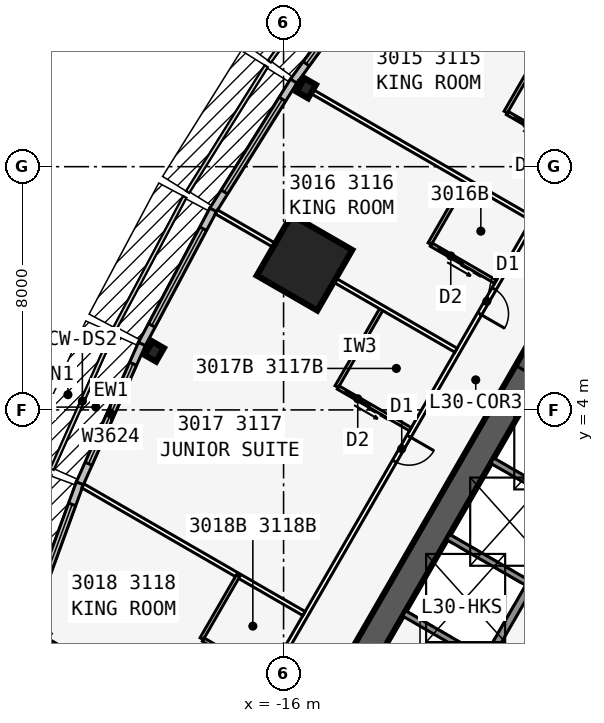
"""IFC4 building model, lengths in metres.
Left out: names, types, materials, properties, quantities, classifications, styles, units other than length and angle.
Written with IfcOpenShell. Run it as: python <this file> out.ifc"""

import sys

from ifc_helpers import new_model, si_unit, direction, frame, frame_2d, origin, origin_2d, place, context, subcontext, project, spatial, rectangle, i_section, extrude, element, fill, save


model = new_model("IFC4")
c1 = context("Model", 3, precision=1e-05, world=origin(), true_north=direction((0.0, 1.0)))
c2 = subcontext(c1, "Body", "Model", "MODEL_VIEW")
j1 = project(units=[si_unit("LENGTHUNIT", "METRE"), si_unit("PLANEANGLEUNIT", "RADIAN")], contexts=[c1])
p1 = place(None, origin())
s1 = spatial("IfcSite", under=j1, at=p1, CompositionType="ELEMENT")
p2 = place(p1, origin())
s2 = spatial("IfcBuilding", under=s1, at=p2, CompositionType="ELEMENT")
p3 = place(p2, frame((0.0, 0.0, 118.1)))
s3 = spatial("IfcBuildingStorey", under=s2, at=p3, CompositionType="ELEMENT", Elevation=118.1)
p4 = place(p3, frame((0.0, 19.052, 0.0), z_axis=(0.0, 0.0, 1.0), x_axis=(-0.499999749417, -0.866025548458, 0.0)))
e1 = element("IfcWall", 1, at=p4, inside=s3, PredefinedType="SHEAR", context=c2, shape_type="SweptSolid", body=[
    extrude(rectangle(XDim=33.0, YDim=0.9, at=frame_2d((16.5, 0.0))), origin(), (0.0, 0.0, 1.0), 3.4),
])
p5 = place(p4, frame((14.15, 0.0, 0.0)))
e2 = element("IfcOpeningElement", 2, at=p5, cuts=e1, PredefinedType="OPENING", context=c2, shape_type="SweptSolid", body=[
    extrude(rectangle(XDim=1.8, YDim=2.13, at=frame_2d((0.9, 1.065))), frame((0.0, 0.46, 0.0), z_axis=(0.0, -1.0, 0.0), x_axis=(1.0, 0.0, 0.0)), (0.0, 0.0, 1.0), 0.92),
])
p6 = place(p4, frame((12.6, 0.0, 0.0)))
e3 = element("IfcOpeningElement", 3, at=p6, cuts=e1, PredefinedType="OPENING", context=c2, shape_type="SweptSolid", body=[
    extrude(rectangle(XDim=1.0, YDim=2.13, at=frame_2d((0.5, 1.065))), frame((0.0, 0.46, 0.0), z_axis=(0.0, -1.0, 0.0), x_axis=(1.0, 0.0, 0.0)), (0.0, 0.0, 1.0), 0.92),
])
p7 = place(p3, frame((-4.929, 3.365, 0.0), z_axis=(0.0, 0.0, 1.0), x_axis=(-0.499991433582, -0.866030349552, 0.0)))
e4 = element("IfcWall", 4, at=p7, inside=s3, PredefinedType="SOLIDWALL", context=c2, shape_type="SweptSolid", body=[
    extrude(rectangle(XDim=10.633, YDim=0.25, at=frame_2d((5.316, 0.0))), origin(), (0.0, 0.0, 1.0), 3.235),
])
p8 = place(p7, frame((9.164, 0.0, 0.0)))
e5 = element("IfcOpeningElement", 5, at=p8, cuts=e4, PredefinedType="OPENING", context=c2, shape_type="SweptSolid", body=[
    extrude(rectangle(XDim=0.9, YDim=2.13, at=frame_2d((0.45, 1.065))), frame((0.0, 0.135, 0.0), z_axis=(0.0, -1.0, 0.0), x_axis=(1.0, 0.0, 0.0)), (0.0, 0.0, 1.0), 0.27),
])
for number, where, z_axis, x_axis in (
    (6, (-6.429, 0.767, 0.0), (0.0, 0.0, 1.0), (-0.866, 0.5, 0.0)),
    (7, (-7.879, -1.744, 0.0), (0.0, 0.0, 1.0), (-0.866, 0.5, 0.0)),
    (8, (-9.329, -4.256, 0.0), (0.0, 0.0, 1.0), (-0.866, 0.5, 0.0)),
):
    element("IfcWall", number, at=place(p3, frame(where, z_axis=z_axis, x_axis=x_axis)), inside=s3, PredefinedType="SOLIDWALL", context=c2, shape_type="SweptSolid", body=[
        extrude(rectangle(XDim=3.125, YDim=0.2, at=frame_2d((1.562, 0.0))), origin(), (0.0, 0.0, 1.0), 3.235),
    ])
for number, where, z_axis, x_axis in (
    (9, (-15.254, 14.58, 0.0), (0.0, 0.0, 1.0), (-0.866, 0.5, 0.0)),
    (10, (-20.254, 5.92, 0.0), (0.0, 0.0, 1.0), (-0.866, 0.5, 0.0)),
):
    element("IfcColumn", number, at=place(p3, frame(where, z_axis=z_axis, x_axis=x_axis)), inside=s3, PredefinedType="COLUMN", context=c2, shape_type="SweptSolid", body=[
        extrude(i_section(OverallWidth=0.437, OverallDepth=0.513, WebThickness=0.061, FlangeThickness=0.097, at=origin_2d()), origin(), (0.0, 0.0, 1.0), 3.4),
    ])
p9 = place(p3, frame((-15.312, 8.84, 0.0), z_axis=(0.0, 0.0, 1.0), x_axis=(-0.866025403784, 0.5, 0.0)))
e11 = element("IfcColumn", 11, at=p9, inside=s3, PredefinedType="COLUMN", context=c2, shape_type="SweptSolid", body=[
    extrude(rectangle(XDim=2.3, YDim=2.3, at=origin_2d()), origin(), (0.0, 0.0, 1.0), 3.4),
])
p10 = place(p3, frame((-12.718, 18.875, 0.0), z_axis=(0.0, 0.0, 1.0), x_axis=(-0.587669188412, -0.809101307001, 0.0)))
e12 = element("IfcWall", 12, at=p10, inside=s3, PredefinedType="STANDARD", context=c2, shape_type="SweptSolid", body=[
    extrude(rectangle(XDim=5.028, YDim=0.25, at=frame_2d((2.514, 0.0))), origin(), (0.0, 0.0, 1.0), 3.235),
])
p11 = place(p10, frame((0.714, 0.0, 0.45)))
e13 = element("IfcOpeningElement", 13, at=p11, cuts=e12, PredefinedType="OPENING", context=c2, shape_type="SweptSolid", body=[
    extrude(rectangle(XDim=3.6, YDim=2.4, at=frame_2d((1.8, 1.2))), frame((0.0, 0.135, 0.0), z_axis=(0.0, -1.0, 0.0), x_axis=(1.0, 0.0, 0.0)), (0.0, 0.0, 1.0), 0.27),
])
p12 = place(p3, frame((-15.667, 14.814, 0.0), z_axis=(0.0, 0.0, 1.0), x_axis=(-0.529990167382, -0.84800378683, 0.0)))
e14 = element("IfcWall", 14, at=p12, inside=s3, PredefinedType="STANDARD", context=c2, shape_type="SweptSolid", body=[
    extrude(rectangle(XDim=5.003, YDim=0.25, at=frame_2d((2.501, 0.0))), origin(), (0.0, 0.0, 1.0), 3.235),
])
p13 = place(p12, frame((0.701, 0.0, 0.45)))
e15 = element("IfcOpeningElement", 15, at=p13, cuts=e14, PredefinedType="OPENING", context=c2, shape_type="SweptSolid", body=[
    extrude(rectangle(XDim=3.6, YDim=2.4, at=frame_2d((1.8, 1.2))), frame((0.0, 0.135, 0.0), z_axis=(0.0, -1.0, 0.0), x_axis=(1.0, 0.0, 0.0)), (0.0, 0.0, 1.0), 0.27),
])
p14 = place(p3, frame((-18.314, 10.579, 0.0), z_axis=(0.0, 0.0, 1.0), x_axis=(-0.469404966864, -0.882982999317, 0.0)))
e16 = element("IfcWall", 16, at=p14, inside=s3, PredefinedType="STANDARD", context=c2, shape_type="SweptSolid", body=[
    extrude(rectangle(XDim=5.003, YDim=0.25, at=frame_2d((2.501, 0.0))), origin(), (0.0, 0.0, 1.0), 3.235),
])
p15 = place(p14, frame((0.701, 0.0, 0.45)))
e17 = element("IfcOpeningElement", 17, at=p15, cuts=e16, PredefinedType="OPENING", context=c2, shape_type="SweptSolid", body=[
    extrude(rectangle(XDim=3.6, YDim=2.4, at=frame_2d((1.8, 1.2))), frame((0.0, 0.135, 0.0), z_axis=(0.0, -1.0, 0.0), x_axis=(1.0, 0.0, 0.0)), (0.0, 0.0, 1.0), 0.27),
])
p16 = place(p3, frame((-20.659, 6.169, 0.0), z_axis=(0.0, 0.0, 1.0), x_axis=(-0.406832200364, -0.913502906808, 0.0)))
e18 = element("IfcWall", 18, at=p16, inside=s3, PredefinedType="STANDARD", context=c2, shape_type="SweptSolid", body=[
    extrude(rectangle(XDim=5.028, YDim=0.25, at=frame_2d((2.514, 0.0))), origin(), (0.0, 0.0, 1.0), 3.235),
])
p17 = place(p16, frame((0.714, 0.0, 0.45)))
e19 = element("IfcOpeningElement", 19, at=p17, cuts=e18, PredefinedType="OPENING", context=c2, shape_type="SweptSolid", body=[
    extrude(rectangle(XDim=3.6, YDim=2.4, at=frame_2d((1.8, 1.2))), frame((0.0, 0.135, 0.0), z_axis=(0.0, -1.0, 0.0), x_axis=(1.0, 0.0, 0.0)), (0.0, 0.0, 1.0), 0.27),
])
p18 = place(p3, frame((-22.701, 1.584, 0.0), z_axis=(0.0, 0.0, 1.0), x_axis=(-0.343225593282, -0.939252996863, 0.0)))
e20 = element("IfcWall", 20, at=p18, inside=s3, PredefinedType="STANDARD", context=c2, shape_type="SweptSolid", body=[
    extrude(rectangle(XDim=5.076, YDim=0.25, at=frame_2d((2.538, 0.0))), origin(), (0.0, 0.0, 1.0), 3.235),
])
p19 = place(p18, frame((0.738, 0.0, 0.45)))
e21 = element("IfcOpeningElement", 21, at=p19, cuts=e20, PredefinedType="OPENING", context=c2, shape_type="SweptSolid", body=[
    extrude(rectangle(XDim=3.6, YDim=2.4, at=frame_2d((1.8, 1.2))), frame((0.0, 0.135, 0.0), z_axis=(0.0, -1.0, 0.0), x_axis=(1.0, 0.0, 0.0)), (0.0, 0.0, 1.0), 0.27),
])
p20 = place(p3, frame((-0.5, 22.836, 0.0), z_axis=(0.0, 0.0, 1.0), x_axis=(-0.500001677587, -0.866024435227, 0.0)))
e22 = element("IfcWall", 22, at=p20, inside=s3, PredefinedType="PARTITIONING", context=c2, shape_type="SweptSolid", body=[
    extrude(rectangle(XDim=39.054, YDim=0.15, at=frame_2d((19.527, 0.0))), origin(), (0.0, 0.0, 1.0), 3.235),
])
p21 = place(p20, frame((0.352, 0.0, 0.0)))
e23 = element("IfcOpeningElement", 23, at=p21, cuts=e22, PredefinedType="OPENING", context=c2, shape_type="SweptSolid", body=[
    extrude(rectangle(XDim=0.95, YDim=2.13, at=frame_2d((0.475, 1.065))), frame((0.0, 0.085, 0.0), z_axis=(0.0, -1.0, 0.0), x_axis=(1.0, 0.0, 0.0)), (0.0, 0.0, 1.0), 0.17),
])
p22 = place(p20, frame((7.152, 0.0, 0.0)))
e24 = element("IfcOpeningElement", 24, at=p22, cuts=e22, PredefinedType="OPENING", context=c2, shape_type="SweptSolid", body=[
    extrude(rectangle(XDim=0.95, YDim=2.13, at=frame_2d((0.475, 1.065))), frame((0.0, 0.085, 0.0), z_axis=(0.0, -1.0, 0.0), x_axis=(1.0, 0.0, 0.0)), (0.0, 0.0, 1.0), 0.17),
])
p23 = place(p20, frame((12.152, 0.0, 0.0)))
e25 = element("IfcOpeningElement", 25, at=p23, cuts=e22, PredefinedType="OPENING", context=c2, shape_type="SweptSolid", body=[
    extrude(rectangle(XDim=0.95, YDim=2.13, at=frame_2d((0.475, 1.065))), frame((0.0, 0.085, 0.0), z_axis=(0.0, -1.0, 0.0), x_axis=(1.0, 0.0, 0.0)), (0.0, 0.0, 1.0), 0.17),
])
p24 = place(p20, frame((17.152, 0.0, 0.0)))
e26 = element("IfcOpeningElement", 26, at=p24, cuts=e22, PredefinedType="OPENING", context=c2, shape_type="SweptSolid", body=[
    extrude(rectangle(XDim=0.95, YDim=2.13, at=frame_2d((0.475, 1.065))), frame((0.0, 0.085, 0.0), z_axis=(0.0, -1.0, 0.0), x_axis=(1.0, 0.0, 0.0)), (0.0, 0.0, 1.0), 0.17),
])
p25 = place(p20, frame((22.752, 0.0, 0.0)))
e27 = element("IfcOpeningElement", 27, at=p25, cuts=e22, PredefinedType="OPENING", context=c2, shape_type="SweptSolid", body=[
    extrude(rectangle(XDim=0.95, YDim=2.13, at=frame_2d((0.475, 1.065))), frame((0.0, 0.085, 0.0), z_axis=(0.0, -1.0, 0.0), x_axis=(1.0, 0.0, 0.0)), (0.0, 0.0, 1.0), 0.17),
])
p26 = place(p20, frame((32.152, 0.0, 0.0)))
e28 = element("IfcOpeningElement", 28, at=p26, cuts=e22, PredefinedType="OPENING", context=c2, shape_type="SweptSolid", body=[
    extrude(rectangle(XDim=0.95, YDim=2.13, at=frame_2d((0.475, 1.065))), frame((0.0, 0.085, 0.0), z_axis=(0.0, -1.0, 0.0), x_axis=(1.0, 0.0, 0.0)), (0.0, 0.0, 1.0), 0.17),
])
p27 = place(p20, frame((37.752, 0.0, 0.0)))
e29 = element("IfcOpeningElement", 29, at=p27, cuts=e22, PredefinedType="OPENING", context=c2, shape_type="SweptSolid", body=[
    extrude(rectangle(XDim=0.95, YDim=2.13, at=frame_2d((0.475, 1.065))), frame((0.0, 0.085, 0.0), z_axis=(0.0, -1.0, 0.0), x_axis=(1.0, 0.0, 0.0)), (0.0, 0.0, 1.0), 0.17),
])
p28 = place(p3, frame((-5.329, 14.623, 0.0), z_axis=(0.0, 0.0, 1.0), x_axis=(-0.866011723728, 0.500023693804, 0.0)))
e30 = element("IfcWall", 30, at=p28, inside=s3, PredefinedType="PARTITIONING", context=c2, shape_type="SweptSolid", body=[
    extrude(rectangle(XDim=8.395, YDim=0.15, at=frame_2d((4.198, 0.0))), origin(), (0.0, 0.0, 1.0), 2.389),
])
p29 = place(p3, frame((-7.829, 10.293, 0.0), z_axis=(0.0, 0.0, 1.0), x_axis=(-0.866027015393, 0.499997208602, 0.0)))
e31 = element("IfcWall", 31, at=p29, inside=s3, PredefinedType="PARTITIONING", context=c2, shape_type="SweptSolid", body=[
    extrude(rectangle(XDim=8.922, YDim=0.15, at=frame_2d((4.461, 0.0))), origin(), (0.0, 0.0, 1.0), 2.389),
])
p30 = place(p3, frame((-10.329, 5.963, 0.0), z_axis=(0.0, 0.0, 1.0), x_axis=(-0.866025170687, 0.500000403736, 0.0)))
e32 = element("IfcWall", 32, at=p30, inside=s3, PredefinedType="PARTITIONING", context=c2, shape_type="SweptSolid", body=[
    extrude(rectangle(XDim=9.099, YDim=0.15, at=frame_2d((4.549, 0.0))), origin(), (0.0, 0.0, 1.0), 2.389),
])
p31 = place(p3, frame((-15.329, -2.697, 0.0), z_axis=(0.0, 0.0, 1.0), x_axis=(-0.866024316602, 0.50000188305, 0.0)))
e33 = element("IfcWall", 33, at=p31, inside=s3, PredefinedType="PARTITIONING", context=c2, shape_type="SweptSolid", body=[
    extrude(rectangle(XDim=8.395, YDim=0.15, at=frame_2d((4.198, 0.0))), origin(), (0.0, 0.0, 1.0), 2.389),
])
p32 = place(p3, frame((-17.829, -7.027, 0.0), z_axis=(0.0, 0.0, 1.0), x_axis=(-0.866029804378, 0.499992377871, 0.0)))
e34 = element("IfcWall", 34, at=p32, inside=s3, PredefinedType="PARTITIONING", context=c2, shape_type="SweptSolid", body=[
    extrude(rectangle(XDim=7.516, YDim=0.15, at=frame_2d((3.758, 0.0))), origin(), (0.0, 0.0, 1.0), 2.389),
])
p33 = place(p3, frame((-7.493, 15.873, 0.0), z_axis=(0.0, 0.0, 1.0), x_axis=(-0.500077600433, -0.865980596518, 0.0)))
e35 = element("IfcWall", 35, at=p33, inside=s3, PredefinedType="PLUMBINGWALL", context=c2, shape_type="SweptSolid", body=[
    extrude(rectangle(XDim=2.4, YDim=0.12, at=frame_2d((1.2, 0.0))), origin(), (0.0, 0.0, 1.0), 3.235),
])
p34 = place(p3, frame((-6.529, 12.545, 0.0), z_axis=(0.0, 0.0, 1.0), x_axis=(-0.866023955769, 0.500002508028, 0.0)))
e36 = element("IfcWall", 36, at=p34, inside=s3, PredefinedType="PLUMBINGWALL", context=c2, shape_type="SweptSolid", body=[
    extrude(rectangle(XDim=2.44, YDim=0.12, at=frame_2d((1.22, 0.0))), origin(), (0.0, 0.0, 1.0), 3.235),
])
p35 = place(p34, frame((1.25, 0.0, 0.0)))
e37 = element("IfcOpeningElement", 37, at=p35, cuts=e36, PredefinedType="OPENING", context=c2, shape_type="SweptSolid", body=[
    extrude(rectangle(XDim=0.9, YDim=2.13, at=frame_2d((0.45, 1.065))), frame((0.0, 0.07, 0.0), z_axis=(0.0, -1.0, 0.0), x_axis=(1.0, 0.0, 0.0)), (0.0, 0.0, 1.0), 0.14),
])
p36 = place(p3, frame((-9.993, 11.543, 0.0), z_axis=(0.0, 0.0, 1.0), x_axis=(-0.500077600433, -0.865980596518, 0.0)))
e38 = element("IfcWall", 38, at=p36, inside=s3, PredefinedType="PLUMBINGWALL", context=c2, shape_type="SweptSolid", body=[
    extrude(rectangle(XDim=2.4, YDim=0.12, at=frame_2d((1.2, 0.0))), origin(), (0.0, 0.0, 1.0), 3.235),
])
p37 = place(p3, frame((-9.029, 8.215, 0.0), z_axis=(0.0, 0.0, 1.0), x_axis=(-0.866023955769, 0.500002508028, 0.0)))
e39 = element("IfcWall", 39, at=p37, inside=s3, PredefinedType="PLUMBINGWALL", context=c2, shape_type="SweptSolid", body=[
    extrude(rectangle(XDim=2.44, YDim=0.12, at=frame_2d((1.22, 0.0))), origin(), (0.0, 0.0, 1.0), 3.235),
])
p38 = place(p37, frame((1.25, 0.0, 0.0)))
e40 = element("IfcOpeningElement", 40, at=p38, cuts=e39, PredefinedType="OPENING", context=c2, shape_type="SweptSolid", body=[
    extrude(rectangle(XDim=0.9, YDim=2.13, at=frame_2d((0.45, 1.065))), frame((0.0, 0.07, 0.0), z_axis=(0.0, -1.0, 0.0), x_axis=(1.0, 0.0, 0.0)), (0.0, 0.0, 1.0), 0.14),
])
p39 = place(p3, frame((-12.753, 7.363, 0.0), z_axis=(0.0, 0.0, 1.0), x_axis=(-0.50002537861, -0.866010750942, 0.0)))
e41 = element("IfcWall", 41, at=p39, inside=s3, PredefinedType="PLUMBINGWALL", context=c2, shape_type="SweptSolid", body=[
    extrude(rectangle(XDim=3.0, YDim=0.12, at=frame_2d((1.5, 0.0))), origin(), (0.0, 0.0, 1.0), 3.235),
])
p40 = place(p3, frame((-11.829, 3.365, 0.0), z_axis=(0.0, 0.0, 1.0), x_axis=(-0.865997131366, 0.500048966069, 0.0)))
e42 = element("IfcWall", 42, at=p40, inside=s3, PredefinedType="PLUMBINGWALL", context=c2, shape_type="SweptSolid", body=[
    extrude(rectangle(XDim=2.74, YDim=0.12, at=frame_2d((1.37, 0.0))), origin(), (0.0, 0.0, 1.0), 3.235),
])
p41 = place(p40, frame((1.55, 0.0, 0.0)))
e43 = element("IfcOpeningElement", 43, at=p41, cuts=e42, PredefinedType="OPENING", context=c2, shape_type="SweptSolid", body=[
    extrude(rectangle(XDim=0.9, YDim=2.13, at=frame_2d((0.45, 1.065))), frame((0.0, 0.07, 0.0), z_axis=(0.0, -1.0, 0.0), x_axis=(1.0, 0.0, 0.0)), (0.0, 0.0, 1.0), 0.14),
])
p42 = place(p3, frame((-17.493, -1.447, 0.0), z_axis=(0.0, 0.0, 1.0), x_axis=(-0.500033551112, -0.866006032174, 0.0)))
e44 = element("IfcWall", 44, at=p42, inside=s3, PredefinedType="PLUMBINGWALL", context=c2, shape_type="SweptSolid", body=[
    extrude(rectangle(XDim=2.4, YDim=0.12, at=frame_2d((1.2, 0.0))), origin(), (0.0, 0.0, 1.0), 3.235),
])
p43 = place(p3, frame((-16.529, -4.776, 0.0), z_axis=(0.0, 0.0, 1.0), x_axis=(-0.866023955769, 0.500002508028, 0.0)))
e45 = element("IfcWall", 45, at=p43, inside=s3, PredefinedType="PLUMBINGWALL", context=c2, shape_type="SweptSolid", body=[
    extrude(rectangle(XDim=2.44, YDim=0.12, at=frame_2d((1.22, 0.0))), origin(), (0.0, 0.0, 1.0), 3.235),
])
p44 = place(p43, frame((1.25, 0.0, 0.0)))
e46 = element("IfcOpeningElement", 46, at=p44, cuts=e45, PredefinedType="OPENING", context=c2, shape_type="SweptSolid", body=[
    extrude(rectangle(XDim=0.9, YDim=2.13, at=frame_2d((0.45, 1.065))), frame((0.0, 0.07, 0.0), z_axis=(0.0, -1.0, 0.0), x_axis=(1.0, 0.0, 0.0)), (0.0, 0.0, 1.0), 0.14),
])
p45 = place(p11, origin())
e47 = element("IfcWindow", 47, at=p45, inside=s3, PartitioningType="SINGLE_PANEL", PredefinedType="WINDOW", context=c2, shape_type="SweptSolid", body=[
    extrude(rectangle(XDim=3.6, YDim=2.4, at=frame_2d((1.8, 1.2))), frame((0.0, 0.03, 0.0), z_axis=(0.0, -1.0, 0.0), x_axis=(1.0, 0.0, 0.0)), (0.0, 0.0, 1.0), 0.06),
])
fill(e13, e47)
p46 = place(p13, origin())
e48 = element("IfcWindow", 48, at=p46, inside=s3, PartitioningType="SINGLE_PANEL", PredefinedType="WINDOW", context=c2, shape_type="SweptSolid", body=[
    extrude(rectangle(XDim=3.6, YDim=2.4, at=frame_2d((1.8, 1.2))), frame((0.0, 0.03, 0.0), z_axis=(0.0, -1.0, 0.0), x_axis=(1.0, 0.0, 0.0)), (0.0, 0.0, 1.0), 0.06),
])
fill(e15, e48)
p47 = place(p15, origin())
e49 = element("IfcWindow", 49, at=p47, inside=s3, PartitioningType="SINGLE_PANEL", PredefinedType="WINDOW", context=c2, shape_type="SweptSolid", body=[
    extrude(rectangle(XDim=3.6, YDim=2.4, at=frame_2d((1.8, 1.2))), frame((0.0, 0.03, 0.0), z_axis=(0.0, -1.0, 0.0), x_axis=(1.0, 0.0, 0.0)), (0.0, 0.0, 1.0), 0.06),
])
fill(e17, e49)
p48 = place(p17, origin())
e50 = element("IfcWindow", 50, at=p48, inside=s3, PartitioningType="SINGLE_PANEL", PredefinedType="WINDOW", context=c2, shape_type="SweptSolid", body=[
    extrude(rectangle(XDim=3.6, YDim=2.4, at=frame_2d((1.8, 1.2))), frame((0.0, 0.03, 0.0), z_axis=(0.0, -1.0, 0.0), x_axis=(1.0, 0.0, 0.0)), (0.0, 0.0, 1.0), 0.06),
])
fill(e19, e50)
p49 = place(p19, origin())
e51 = element("IfcWindow", 51, at=p49, inside=s3, PartitioningType="SINGLE_PANEL", PredefinedType="WINDOW", context=c2, shape_type="SweptSolid", body=[
    extrude(rectangle(XDim=3.6, YDim=2.4, at=frame_2d((1.8, 1.2))), frame((0.0, 0.03, 0.0), z_axis=(0.0, -1.0, 0.0), x_axis=(1.0, 0.0, 0.0)), (0.0, 0.0, 1.0), 0.06),
])
fill(e21, e51)
p50 = place(p35, origin())
e52 = element("IfcDoor", 52, at=p50, inside=s3, OperationType="SLIDING_TO_LEFT", PredefinedType="DOOR", context=c2, shape_type="SweptSolid", body=[
    extrude(rectangle(XDim=0.9, YDim=2.13, at=frame_2d((0.45, 1.065))), frame((0.0, 0.025, 0.0), z_axis=(0.0, -1.0, 0.0), x_axis=(1.0, 0.0, 0.0)), (0.0, 0.0, 1.0), 0.05),
])
fill(e37, e52)
p51 = place(p38, origin())
e53 = element("IfcDoor", 53, at=p51, inside=s3, OperationType="SLIDING_TO_LEFT", PredefinedType="DOOR", context=c2, shape_type="SweptSolid", body=[
    extrude(rectangle(XDim=0.9, YDim=2.13, at=frame_2d((0.45, 1.065))), frame((0.0, 0.025, 0.0), z_axis=(0.0, -1.0, 0.0), x_axis=(1.0, 0.0, 0.0)), (0.0, 0.0, 1.0), 0.05),
])
fill(e40, e53)
p52 = place(p24, origin())
e54 = element("IfcDoor", 54, at=p52, inside=s3, OperationType="SINGLE_SWING_RIGHT", PredefinedType="DOOR", context=c2, shape_type="SweptSolid", body=[
    extrude(rectangle(XDim=0.95, YDim=2.13, at=frame_2d((0.475, 1.065))), frame((0.0, 0.025, 0.0), z_axis=(0.0, -1.0, 0.0), x_axis=(1.0, 0.0, 0.0)), (0.0, 0.0, 1.0), 0.05),
])
fill(e26, e54)
p53 = place(p41, origin())
e55 = element("IfcDoor", 55, at=p53, inside=s3, OperationType="SLIDING_TO_LEFT", PredefinedType="DOOR", context=c2, shape_type="SweptSolid", body=[
    extrude(rectangle(XDim=0.9, YDim=2.13, at=frame_2d((0.45, 1.065))), frame((0.0, 0.025, 0.0), z_axis=(0.0, -1.0, 0.0), x_axis=(1.0, 0.0, 0.0)), (0.0, 0.0, 1.0), 0.05),
])
fill(e43, e55)
p54 = place(p25, origin())
e56 = element("IfcDoor", 56, at=p54, inside=s3, OperationType="SINGLE_SWING_LEFT", PredefinedType="DOOR", context=c2, shape_type="SweptSolid", body=[
    extrude(rectangle(XDim=0.95, YDim=2.13, at=frame_2d((0.475, 1.065))), frame((0.0, 0.025, 0.0), z_axis=(0.0, -1.0, 0.0), x_axis=(1.0, 0.0, 0.0)), (0.0, 0.0, 1.0), 0.05),
])
fill(e27, e56)
p55 = place(p44, origin())
e57 = element("IfcDoor", 57, at=p55, inside=s3, OperationType="SLIDING_TO_LEFT", PredefinedType="DOOR", context=c2, shape_type="SweptSolid", body=[
    extrude(rectangle(XDim=0.9, YDim=2.13, at=frame_2d((0.45, 1.065))), frame((0.0, 0.025, 0.0), z_axis=(0.0, -1.0, 0.0), x_axis=(1.0, 0.0, 0.0)), (0.0, 0.0, 1.0), 0.05),
])
fill(e46, e57)
save(model, sys.argv[1])
